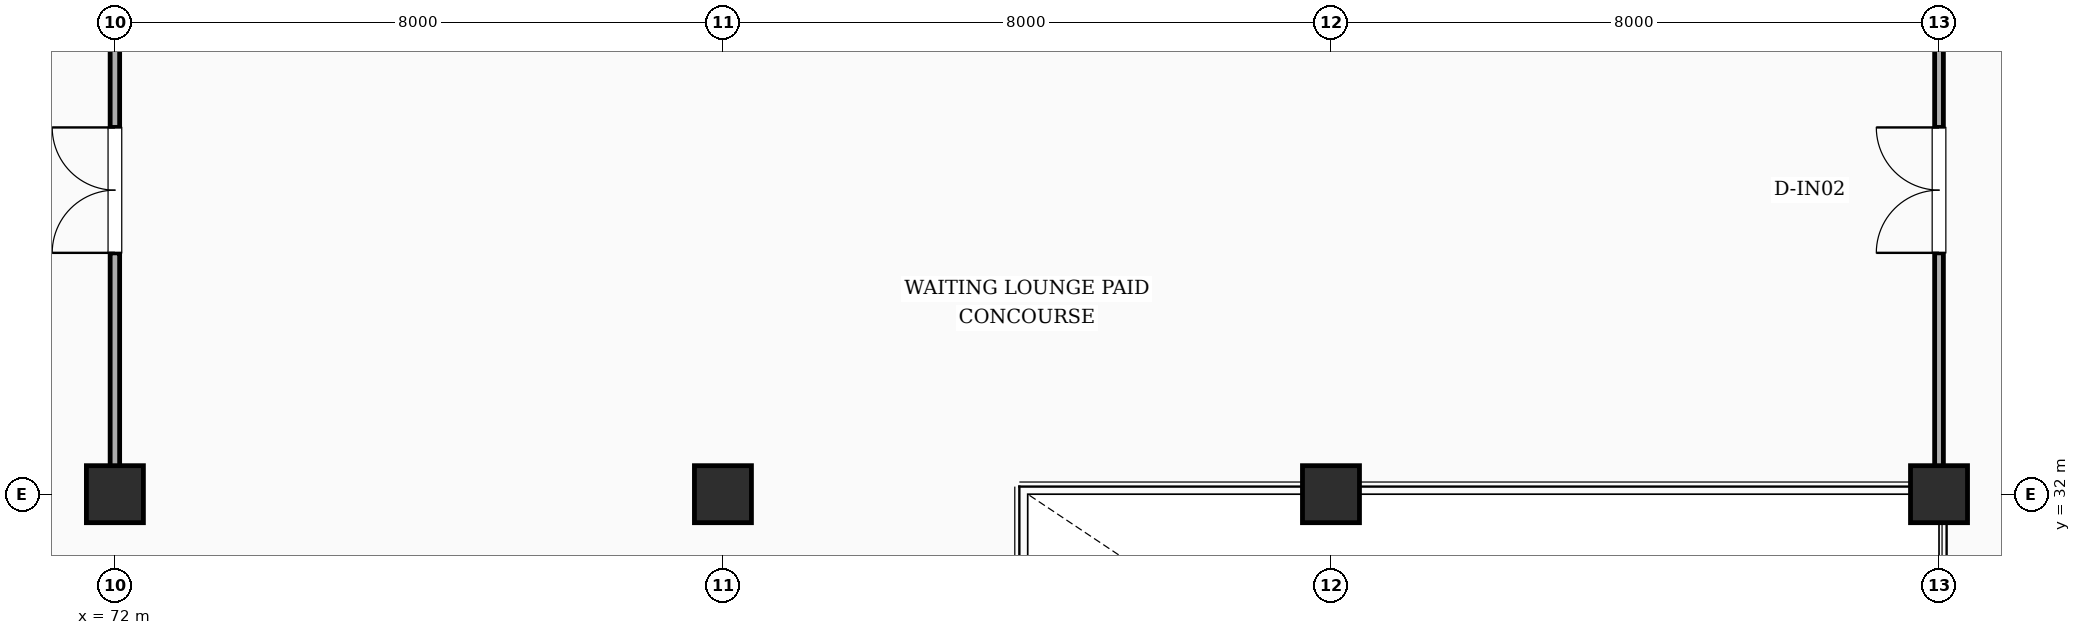
"""IFC4 building model, lengths in metres.
Left out: names, types, materials, properties, quantities, classifications, styles, units other than length and angle.
Written with IfcOpenShell. Run it as: python <this file> out.ifc"""

import sys

from ifc_helpers import new_model, si_unit, direction, frame, frame_2d, origin, origin_2d, place, context, subcontext, project, spatial, rectangle, extrude, element, fill, save


model = new_model("IFC4")
c1 = context("Model", 3, precision=1e-05, world=origin(), true_north=direction((0.0, 1.0)))
c2 = subcontext(c1, "Body", "Model", "MODEL_VIEW")
j1 = project(units=[si_unit("LENGTHUNIT", "METRE"), si_unit("PLANEANGLEUNIT", "RADIAN")], contexts=[c1])
p1 = place(None, origin())
s1 = spatial("IfcSite", under=j1, at=p1, CompositionType="ELEMENT")
p2 = place(p1, origin())
s2 = spatial("IfcBuilding", under=s1, at=p2, CompositionType="ELEMENT")
p3 = place(p2, frame((0.0, 0.0, 5.4)))
s3 = spatial("IfcBuildingStorey", under=s2, at=p3, CompositionType="ELEMENT", Elevation=5.4)
for number, where, z_axis, x_axis in (
    (1, (72.0, 32.0, 0.0), (0.0, 0.0, 1.0), (1.0, 0.0, 0.0)),
    (2, (80.0, 32.0, 0.0), (0.0, 0.0, 1.0), (1.0, 0.0, 0.0)),
    (3, (88.0, 32.0, 0.0), (0.0, 0.0, 1.0), (1.0, 0.0, 0.0)),
    (4, (96.0, 32.0, 0.0), (0.0, 0.0, 1.0), (1.0, 0.0, 0.0)),
):
    element("IfcColumn", number, at=place(p3, frame(where, z_axis=z_axis, x_axis=x_axis)), inside=s3, PredefinedType="COLUMN", context=c2, shape_type="SweptSolid", body=[
        extrude(rectangle(XDim=0.75, YDim=0.75, at=origin_2d()), origin(), (0.0, 0.0, 1.0), 5.4),
    ])
p4 = place(p3, frame((72.0, 32.12, 0.0), z_axis=(0.0, 0.0, 1.0), x_axis=(0.0, 1.0, 0.0)))
e5 = element("IfcWall", 5, at=p4, inside=s3, PredefinedType="PARTITIONING", context=c2, shape_type="SweptSolid", body=[
    extrude(rectangle(XDim=7.76, YDim=0.125, at=frame_2d((3.88, 0.0))), origin(), (0.0, 0.0, 1.0), 4.38),
])
p5 = place(p4, frame((3.055, 0.0, 0.0)))
e6 = element("IfcOpeningElement", 6, at=p5, cuts=e5, PredefinedType="OPENING", context=c2, shape_type="SweptSolid", body=[
    extrude(rectangle(XDim=1.65, YDim=2.25, at=frame_2d((0.825, 1.125))), frame((0.0, 0.073, 0.0), z_axis=(0.0, -1.0, 0.0), x_axis=(1.0, 0.0, 0.0)), (0.0, 0.0, 1.0), 0.145),
])
p6 = place(p3, frame((96.0, 32.12, 0.0), z_axis=(0.0, 0.0, 1.0), x_axis=(0.0, 1.0, 0.0)))
e7 = element("IfcWall", 7, at=p6, inside=s3, PredefinedType="PARTITIONING", context=c2, shape_type="SweptSolid", body=[
    extrude(rectangle(XDim=7.76, YDim=0.115, at=frame_2d((3.88, 0.0))), origin(), (0.0, 0.0, 1.0), 4.38),
])
p7 = place(p6, frame((3.055, 0.0, 0.0)))
e8 = element("IfcOpeningElement", 8, at=p7, cuts=e7, PredefinedType="OPENING", context=c2, shape_type="SweptSolid", body=[
    extrude(rectangle(XDim=1.65, YDim=2.25, at=frame_2d((0.825, 1.125))), frame((0.0, 0.067, 0.0), z_axis=(0.0, -1.0, 0.0), x_axis=(1.0, 0.0, 0.0)), (0.0, 0.0, 1.0), 0.135),
])
p8 = place(p5, origin())
e9 = element("IfcDoor", 9, at=p8, inside=s3, OperationType="DOUBLE_DOOR_SINGLE_SWING", PredefinedType="DOOR", context=c2, shape_type="SweptSolid", body=[
    extrude(rectangle(XDim=1.65, YDim=2.25, at=frame_2d((0.825, 1.125))), frame((0.0, 0.025, 0.0), z_axis=(0.0, -1.0, 0.0), x_axis=(1.0, 0.0, 0.0)), (0.0, 0.0, 1.0), 0.05),
])
fill(e6, e9)
p9 = place(p7, origin())
e10 = element("IfcDoor", 10, at=p9, inside=s3, OperationType="DOUBLE_DOOR_SINGLE_SWING", PredefinedType="DOOR", context=c2, shape_type="SweptSolid", body=[
    extrude(rectangle(XDim=1.65, YDim=2.25, at=frame_2d((0.825, 1.125))), frame((0.0, 0.025, 0.0), z_axis=(0.0, -1.0, 0.0), x_axis=(1.0, 0.0, 0.0)), (0.0, 0.0, 1.0), 0.05),
])
fill(e8, e10)
save(model, sys.argv[1])
